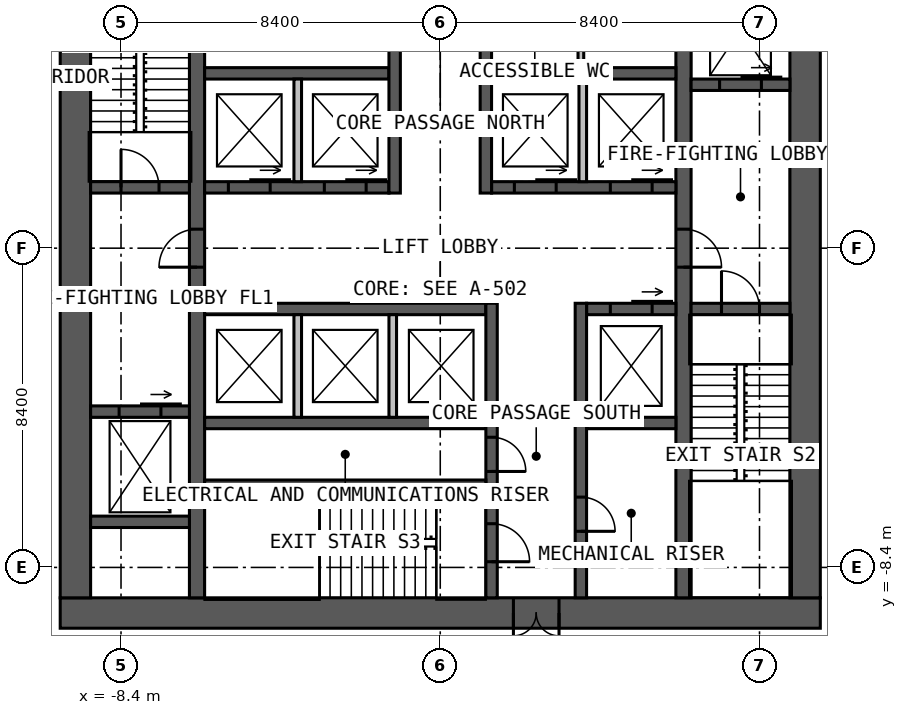
"""IFC4 building model, lengths in metres.
Left out: names, types, materials, properties, quantities, classifications, styles, units other than length and angle.
Written with IfcOpenShell. Run it as: python <this file> out.ifc"""

import sys

from ifc_helpers import new_model, si_unit, direction, frame, frame_2d, origin, place, context, subcontext, project, spatial, rectangle, extrude, element, fill, save


model = new_model("IFC4")
c1 = context("Model", 3, precision=1e-05, world=origin(), true_north=direction((0.0, 1.0)))
c2 = subcontext(c1, "Body", "Model", "MODEL_VIEW")
j1 = project(units=[si_unit("LENGTHUNIT", "METRE"), si_unit("PLANEANGLEUNIT", "RADIAN")], contexts=[c1])
p1 = place(None, origin())
s1 = spatial("IfcSite", under=j1, at=p1, CompositionType="ELEMENT")
p2 = place(p1, origin())
s2 = spatial("IfcBuilding", under=s1, at=p2, CompositionType="ELEMENT")
p3 = place(p2, frame((0.0, 0.0, 53.0)))
s3 = spatial("IfcBuildingStorey", under=s2, at=p3, CompositionType="ELEMENT", Elevation=53.0)
p4 = place(p3, frame((10.0, -9.6, 0.0), z_axis=(0.0, 0.0, 1.0), x_axis=(-1.0, 0.0, 0.0)))
e1 = element("IfcWall", 1, at=p4, inside=s3, PredefinedType="SOLIDWALL", context=c2, shape_type="SweptSolid", body=[
    extrude(rectangle(XDim=20.0, YDim=0.8, at=frame_2d((10.0, 0.0))), origin(), (0.0, 0.0, 1.0), 4.0),
])
p5 = place(p4, frame((6.875, 0.0, 0.0)))
e2 = element("IfcOpeningElement", 2, at=p5, cuts=e1, PredefinedType="OPENING", context=c2, shape_type="SweptSolid", body=[
    extrude(rectangle(XDim=1.2, YDim=2.2, at=frame_2d((0.6, 1.1))), frame((0.0, 0.41, 0.0), z_axis=(0.0, -1.0, 0.0), x_axis=(1.0, 0.0, 0.0)), (0.0, 0.0, 1.0), 0.82),
])
for number, where, z_axis, x_axis in (
    (3, (9.6, -9.2, 0.0), (0.0, 0.0, 1.0), (0.0, 1.0, 0.0)),
    (4, (-9.6, 9.2, 0.0), (0.0, 0.0, 1.0), (0.0, -1.0, 0.0)),
):
    element("IfcWall", number, at=place(p3, frame(where, z_axis=z_axis, x_axis=x_axis)), inside=s3, PredefinedType="SOLIDWALL", context=c2, shape_type="SweptSolid", body=[
        extrude(rectangle(XDim=18.4, YDim=0.8, at=frame_2d((9.2, 0.0))), origin(), (0.0, 0.0, 1.0), 4.0),
    ])
p6 = place(p3, frame((-6.4, -9.2, 0.0), z_axis=(0.0, 0.0, 1.0), x_axis=(0.0, 1.0, 0.0)))
e5 = element("IfcWall", 5, at=p6, inside=s3, PredefinedType="SOLIDWALL", context=c2, shape_type="SweptSolid", body=[
    extrude(rectangle(XDim=18.4, YDim=0.4, at=frame_2d((9.2, 0.0))), origin(), (0.0, 0.0, 1.0), 4.0),
])
p7 = place(p6, frame((8.7, 0.0, 0.0)))
e6 = element("IfcOpeningElement", 6, at=p7, cuts=e5, PredefinedType="OPENING", context=c2, shape_type="SweptSolid", body=[
    extrude(rectangle(XDim=1.0, YDim=2.2, at=frame_2d((0.5, 1.1))), frame((0.0, 0.21, 0.0), z_axis=(0.0, -1.0, 0.0), x_axis=(1.0, 0.0, 0.0)), (0.0, 0.0, 1.0), 0.42),
])
p8 = place(p3, frame((6.4, 9.2, 0.0), z_axis=(0.0, 0.0, 1.0), x_axis=(0.0, -1.0, 0.0)))
e7 = element("IfcWall", 7, at=p8, inside=s3, PredefinedType="SOLIDWALL", context=c2, shape_type="SweptSolid", body=[
    extrude(rectangle(XDim=18.4, YDim=0.4, at=frame_2d((9.2, 0.0))), origin(), (0.0, 0.0, 1.0), 4.0),
])
p9 = place(p8, frame((8.7, 0.0, 0.0)))
e8 = element("IfcOpeningElement", 8, at=p9, cuts=e7, PredefinedType="OPENING", context=c2, shape_type="SweptSolid", body=[
    extrude(rectangle(XDim=1.0, YDim=2.2, at=frame_2d((0.5, 1.1))), frame((0.0, 0.21, 0.0), z_axis=(0.0, -1.0, 0.0), x_axis=(1.0, 0.0, 0.0)), (0.0, 0.0, 1.0), 0.42),
])
p10 = place(p3, frame((-6.2, 1.6, 0.0), z_axis=(0.0, 0.0, 1.0), x_axis=(1.0, 0.0, 0.0)))
e9 = element("IfcWall", 9, at=p10, inside=s3, PredefinedType="SOLIDWALL", context=c2, shape_type="SweptSolid", body=[
    extrude(rectangle(XDim=4.85, YDim=0.3, at=frame_2d((2.425, 0.0))), origin(), (0.0, 0.0, 1.0), 4.0),
])
p11 = place(p10, frame((0.625, 0.0, 0.0)))
e10 = element("IfcOpeningElement", 10, at=p11, cuts=e9, PredefinedType="OPENING", context=c2, shape_type="SweptSolid", body=[
    extrude(rectangle(XDim=1.1, YDim=2.2, at=frame_2d((0.55, 1.1))), frame((0.0, 0.16, 0.0), z_axis=(0.0, -1.0, 0.0), x_axis=(1.0, 0.0, 0.0)), (0.0, 0.0, 1.0), 0.32),
])
p12 = place(p10, frame((3.15, 0.0, 0.0)))
e11 = element("IfcOpeningElement", 11, at=p12, cuts=e9, PredefinedType="OPENING", context=c2, shape_type="SweptSolid", body=[
    extrude(rectangle(XDim=1.1, YDim=2.2, at=frame_2d((0.55, 1.1))), frame((0.0, 0.16, 0.0), z_axis=(0.0, -1.0, 0.0), x_axis=(1.0, 0.0, 0.0)), (0.0, 0.0, 1.0), 0.32),
])
p13 = place(p3, frame((1.35, 1.6, 0.0), z_axis=(0.0, 0.0, 1.0), x_axis=(1.0, 0.0, 0.0)))
e12 = element("IfcWall", 12, at=p13, inside=s3, PredefinedType="SOLIDWALL", context=c2, shape_type="SweptSolid", body=[
    extrude(rectangle(XDim=4.85, YDim=0.3, at=frame_2d((2.425, 0.0))), origin(), (0.0, 0.0, 1.0), 4.0),
])
p14 = place(p13, frame((0.6, 0.0, 0.0)))
e13 = element("IfcOpeningElement", 13, at=p14, cuts=e12, PredefinedType="OPENING", context=c2, shape_type="SweptSolid", body=[
    extrude(rectangle(XDim=1.1, YDim=2.2, at=frame_2d((0.55, 1.1))), frame((0.0, 0.16, 0.0), z_axis=(0.0, -1.0, 0.0), x_axis=(1.0, 0.0, 0.0)), (0.0, 0.0, 1.0), 0.32),
])
p15 = place(p13, frame((3.125, 0.0, 0.0)))
e14 = element("IfcOpeningElement", 14, at=p15, cuts=e12, PredefinedType="OPENING", context=c2, shape_type="SweptSolid", body=[
    extrude(rectangle(XDim=1.1, YDim=2.2, at=frame_2d((0.55, 1.1))), frame((0.0, 0.16, 0.0), z_axis=(0.0, -1.0, 0.0), x_axis=(1.0, 0.0, 0.0)), (0.0, 0.0, 1.0), 0.32),
])
for number, where, z_axis, x_axis in (
    (15, (-6.2, 4.6, 0.0), (0.0, 0.0, 1.0), (1.0, 0.0, 0.0)),
    (16, (1.35, 4.6, 0.0), (0.0, 0.0, 1.0), (1.0, 0.0, 0.0)),
):
    element("IfcWall", number, at=place(p3, frame(where, z_axis=z_axis, x_axis=x_axis)), inside=s3, PredefinedType="SOLIDWALL", context=c2, shape_type="SweptSolid", body=[
        extrude(rectangle(XDim=4.85, YDim=0.3, at=frame_2d((2.425, 0.0))), origin(), (0.0, 0.0, 1.0), 4.0),
    ])
p16 = place(p3, frame((-1.2, 1.45, 0.0), z_axis=(0.0, 0.0, 1.0), x_axis=(0.0, 1.0, 0.0)))
e17 = element("IfcWall", 17, at=p16, inside=s3, PredefinedType="SOLIDWALL", context=c2, shape_type="SweptSolid", body=[
    extrude(rectangle(XDim=7.75, YDim=0.3, at=frame_2d((3.875, 0.0))), origin(), (0.0, 0.0, 1.0), 4.0),
])
p17 = place(p16, frame((5.05, 0.0, 0.0)))
e18 = element("IfcOpeningElement", 18, at=p17, cuts=e17, PredefinedType="OPENING", context=c2, shape_type="SweptSolid", body=[
    extrude(rectangle(XDim=1.0, YDim=2.2, at=frame_2d((0.5, 1.1))), frame((0.0, 0.16, 0.0), z_axis=(0.0, -1.0, 0.0), x_axis=(1.0, 0.0, 0.0)), (0.0, 0.0, 1.0), 0.32),
])
p18 = place(p3, frame((1.2, 1.45, 0.0), z_axis=(0.0, 0.0, 1.0), x_axis=(0.0, 1.0, 0.0)))
e19 = element("IfcWall", 19, at=p18, inside=s3, PredefinedType="SOLIDWALL", context=c2, shape_type="SweptSolid", body=[
    extrude(rectangle(XDim=7.75, YDim=0.3, at=frame_2d((3.875, 0.0))), origin(), (0.0, 0.0, 1.0), 4.0),
])
p19 = place(p18, frame((3.8, 0.0, 0.0)))
e20 = element("IfcOpeningElement", 20, at=p19, cuts=e19, PredefinedType="OPENING", context=c2, shape_type="SweptSolid", body=[
    extrude(rectangle(XDim=1.0, YDim=2.2, at=frame_2d((0.5, 1.1))), frame((0.0, 0.16, 0.0), z_axis=(0.0, -1.0, 0.0), x_axis=(1.0, 0.0, 0.0)), (0.0, 0.0, 1.0), 0.32),
])
p20 = place(p18, frame((6.15, 0.0, 0.0)))
e21 = element("IfcOpeningElement", 21, at=p20, cuts=e19, PredefinedType="OPENING", context=c2, shape_type="SweptSolid", body=[
    extrude(rectangle(XDim=1.0, YDim=2.2, at=frame_2d((0.5, 1.1))), frame((0.0, 0.16, 0.0), z_axis=(0.0, -1.0, 0.0), x_axis=(1.0, 0.0, 0.0)), (0.0, 0.0, 1.0), 0.32),
])
p21 = place(p3, frame((-6.2, -1.6, 0.0), z_axis=(0.0, 0.0, 1.0), x_axis=(1.0, 0.0, 0.0)))
e22 = element("IfcWall", 22, at=p21, inside=s3, PredefinedType="SOLIDWALL", context=c2, shape_type="SweptSolid", body=[
    extrude(rectangle(XDim=7.4, YDim=0.3, at=frame_2d((3.7, 0.0))), origin(), (0.0, 0.0, 1.0), 4.0),
])
p22 = place(p3, frame((3.85, -1.6, 0.0), z_axis=(0.0, 0.0, 1.0), x_axis=(1.0, 0.0, 0.0)))
e23 = element("IfcWall", 23, at=p22, inside=s3, PredefinedType="SOLIDWALL", context=c2, shape_type="SweptSolid", body=[
    extrude(rectangle(XDim=2.35, YDim=0.3, at=frame_2d((1.175, 0.0))), origin(), (0.0, 0.0, 1.0), 4.0),
])
p23 = place(p22, frame((0.625, 0.0, 0.0)))
e24 = element("IfcOpeningElement", 24, at=p23, cuts=e23, PredefinedType="OPENING", context=c2, shape_type="SweptSolid", body=[
    extrude(rectangle(XDim=1.1, YDim=2.2, at=frame_2d((0.55, 1.1))), frame((0.0, 0.16, 0.0), z_axis=(0.0, -1.0, 0.0), x_axis=(1.0, 0.0, 0.0)), (0.0, 0.0, 1.0), 0.32),
])
p24 = place(p3, frame((-6.2, -4.6, 0.0), z_axis=(0.0, 0.0, 1.0), x_axis=(1.0, 0.0, 0.0)))
e25 = element("IfcWall", 25, at=p24, inside=s3, PredefinedType="SOLIDWALL", context=c2, shape_type="SweptSolid", body=[
    extrude(rectangle(XDim=7.4, YDim=0.3, at=frame_2d((3.7, 0.0))), origin(), (0.0, 0.0, 1.0), 4.0),
])
p25 = place(p3, frame((3.85, -4.6, 0.0), z_axis=(0.0, 0.0, 1.0), x_axis=(1.0, 0.0, 0.0)))
e26 = element("IfcWall", 26, at=p25, inside=s3, PredefinedType="SOLIDWALL", context=c2, shape_type="SweptSolid", body=[
    extrude(rectangle(XDim=2.35, YDim=0.3, at=frame_2d((1.175, 0.0))), origin(), (0.0, 0.0, 1.0), 4.0),
])
p26 = place(p3, frame((1.35, -1.45, 0.0), z_axis=(0.0, 0.0, 1.0), x_axis=(0.0, -1.0, 0.0)))
e27 = element("IfcWall", 27, at=p26, inside=s3, PredefinedType="SOLIDWALL", context=c2, shape_type="SweptSolid", body=[
    extrude(rectangle(XDim=7.75, YDim=0.3, at=frame_2d((3.875, 0.0))), origin(), (0.0, 0.0, 1.0), 4.0),
])
p27 = place(p26, frame((5.8, 0.0, 0.0)))
e28 = element("IfcOpeningElement", 28, at=p27, cuts=e27, PredefinedType="OPENING", context=c2, shape_type="SweptSolid", body=[
    extrude(rectangle(XDim=1.0, YDim=2.2, at=frame_2d((0.5, 1.1))), frame((0.0, 0.16, 0.0), z_axis=(0.0, -1.0, 0.0), x_axis=(1.0, 0.0, 0.0)), (0.0, 0.0, 1.0), 0.32),
])
p28 = place(p26, frame((3.525, 0.0, 0.0)))
e29 = element("IfcOpeningElement", 29, at=p28, cuts=e27, PredefinedType="OPENING", context=c2, shape_type="SweptSolid", body=[
    extrude(rectangle(XDim=0.9, YDim=2.2, at=frame_2d((0.45, 1.1))), frame((0.0, 0.16, 0.0), z_axis=(0.0, -1.0, 0.0), x_axis=(1.0, 0.0, 0.0)), (0.0, 0.0, 1.0), 0.32),
])
p29 = place(p3, frame((3.7, -1.45, 0.0), z_axis=(0.0, 0.0, 1.0), x_axis=(0.0, -1.0, 0.0)))
e30 = element("IfcWall", 30, at=p29, inside=s3, PredefinedType="SOLIDWALL", context=c2, shape_type="SweptSolid", body=[
    extrude(rectangle(XDim=7.75, YDim=0.3, at=frame_2d((3.875, 0.0))), origin(), (0.0, 0.0, 1.0), 4.0),
])
p30 = place(p29, frame((5.1, 0.0, 0.0)))
e31 = element("IfcOpeningElement", 31, at=p30, cuts=e30, PredefinedType="OPENING", context=c2, shape_type="SweptSolid", body=[
    extrude(rectangle(XDim=0.9, YDim=2.2, at=frame_2d((0.45, 1.1))), frame((0.0, 0.16, 0.0), z_axis=(0.0, -1.0, 0.0), x_axis=(1.0, 0.0, 0.0)), (0.0, 0.0, 1.0), 0.32),
])
p31 = place(p3, frame((-6.2, -6.2, 0.0), z_axis=(0.0, 0.0, 1.0), x_axis=(1.0, 0.0, 0.0)))
e32 = element("IfcWall", 32, at=p31, inside=s3, PredefinedType="SOLIDWALL", context=c2, shape_type="SweptSolid", body=[
    extrude(rectangle(XDim=7.4, YDim=0.2, at=frame_2d((3.7, 0.0))), origin(), (0.0, 0.0, 1.0), 4.0),
])
p32 = place(p3, frame((-9.2, 1.6, 0.0), z_axis=(0.0, 0.0, 1.0), x_axis=(1.0, 0.0, 0.0)))
e33 = element("IfcWall", 33, at=p32, inside=s3, PredefinedType="SOLIDWALL", context=c2, shape_type="SweptSolid", body=[
    extrude(rectangle(XDim=2.6, YDim=0.3, at=frame_2d((1.3, 0.0))), origin(), (0.0, 0.0, 1.0), 4.0),
])
p33 = place(p32, frame((0.8, 0.0, 0.0)))
e34 = element("IfcOpeningElement", 34, at=p33, cuts=e33, PredefinedType="OPENING", context=c2, shape_type="SweptSolid", body=[
    extrude(rectangle(XDim=1.0, YDim=2.2, at=frame_2d((0.5, 1.1))), frame((0.0, 0.16, 0.0), z_axis=(0.0, -1.0, 0.0), x_axis=(1.0, 0.0, 0.0)), (0.0, 0.0, 1.0), 0.32),
])
p34 = place(p3, frame((6.6, -1.6, 0.0), z_axis=(0.0, 0.0, 1.0), x_axis=(1.0, 0.0, 0.0)))
e35 = element("IfcWall", 35, at=p34, inside=s3, PredefinedType="SOLIDWALL", context=c2, shape_type="SweptSolid", body=[
    extrude(rectangle(XDim=2.6, YDim=0.3, at=frame_2d((1.3, 0.0))), origin(), (0.0, 0.0, 1.0), 4.0),
])
p35 = place(p34, frame((0.8, 0.0, 0.0)))
e36 = element("IfcOpeningElement", 36, at=p35, cuts=e35, PredefinedType="OPENING", context=c2, shape_type="SweptSolid", body=[
    extrude(rectangle(XDim=1.0, YDim=2.2, at=frame_2d((0.5, 1.1))), frame((0.0, 0.16, 0.0), z_axis=(0.0, -1.0, 0.0), x_axis=(1.0, 0.0, 0.0)), (0.0, 0.0, 1.0), 0.32),
])
p36 = place(p3, frame((-9.2, -4.3, 0.0), z_axis=(0.0, 0.0, 1.0), x_axis=(1.0, 0.0, 0.0)))
e37 = element("IfcWall", 37, at=p36, inside=s3, PredefinedType="SOLIDWALL", context=c2, shape_type="SweptSolid", body=[
    extrude(rectangle(XDim=2.6, YDim=0.3, at=frame_2d((1.3, 0.0))), origin(), (0.0, 0.0, 1.0), 4.0),
])
p37 = place(p36, frame((0.75, 0.0, 0.0)))
e38 = element("IfcOpeningElement", 38, at=p37, cuts=e37, PredefinedType="OPENING", context=c2, shape_type="SweptSolid", body=[
    extrude(rectangle(XDim=1.1, YDim=2.2, at=frame_2d((0.55, 1.1))), frame((0.0, 0.16, 0.0), z_axis=(0.0, -1.0, 0.0), x_axis=(1.0, 0.0, 0.0)), (0.0, 0.0, 1.0), 0.32),
])
p38 = place(p3, frame((6.6, 4.3, 0.0), z_axis=(0.0, 0.0, 1.0), x_axis=(1.0, 0.0, 0.0)))
e39 = element("IfcWall", 39, at=p38, inside=s3, PredefinedType="SOLIDWALL", context=c2, shape_type="SweptSolid", body=[
    extrude(rectangle(XDim=2.6, YDim=0.3, at=frame_2d((1.3, 0.0))), origin(), (0.0, 0.0, 1.0), 4.0),
])
p39 = place(p38, frame((0.75, 0.0, 0.0)))
e40 = element("IfcOpeningElement", 40, at=p39, cuts=e39, PredefinedType="OPENING", context=c2, shape_type="SweptSolid", body=[
    extrude(rectangle(XDim=1.1, YDim=2.2, at=frame_2d((0.55, 1.1))), frame((0.0, 0.16, 0.0), z_axis=(0.0, -1.0, 0.0), x_axis=(1.0, 0.0, 0.0)), (0.0, 0.0, 1.0), 0.32),
])
p40 = place(p3, frame((-9.2, -7.2, 0.0), z_axis=(0.0, 0.0, 1.0), x_axis=(1.0, 0.0, 0.0)))
e41 = element("IfcWall", 41, at=p40, inside=s3, PredefinedType="SOLIDWALL", context=c2, shape_type="SweptSolid", body=[
    extrude(rectangle(XDim=2.6, YDim=0.3, at=frame_2d((1.3, 0.0))), origin(), (0.0, 0.0, 1.0), 4.0),
])
for number, where, z_axis, x_axis in (
    (42, (-3.75, 1.75, 0.0), (0.0, 0.0, 1.0), (0.0, 1.0, 0.0)),
    (43, (3.75, 1.75, 0.0), (0.0, 0.0, 1.0), (0.0, 1.0, 0.0)),
    (44, (-3.75, -1.75, 0.0), (0.0, 0.0, 1.0), (0.0, -1.0, 0.0)),
    (45, (-1.25, -1.75, 0.0), (0.0, 0.0, 1.0), (0.0, -1.0, 0.0)),
):
    element("IfcWall", number, at=place(p3, frame(where, z_axis=z_axis, x_axis=x_axis)), inside=s3, PredefinedType="SOLIDWALL", context=c2, shape_type="SweptSolid", body=[
        extrude(rectangle(XDim=2.7, YDim=0.2, at=frame_2d((1.35, 0.0))), origin(), (0.0, 0.0, 1.0), 3.75),
    ])
p41 = place(p3, frame((3.7, 4.75, 0.0), z_axis=(0.0, 0.0, 1.0), x_axis=(0.0, 1.0, 0.0)))
e46 = element("IfcWall", 46, at=p41, inside=s3, PredefinedType="PARTITIONING", context=c2, shape_type="SweptSolid", body=[
    extrude(rectangle(XDim=1.975, YDim=0.15, at=frame_2d((0.988, 0.0))), origin(), (0.0, 0.0, 1.0), 3.75),
])
p42 = place(p5, origin())
e47 = element("IfcDoor", 47, at=p42, inside=s3, OperationType="DOUBLE_DOOR_SINGLE_SWING", PredefinedType="DOOR", context=c2, shape_type="SweptSolid", body=[
    extrude(rectangle(XDim=1.2, YDim=2.2, at=frame_2d((0.6, 1.1))), frame((0.0, 0.025, 0.0), z_axis=(0.0, -1.0, 0.0), x_axis=(1.0, 0.0, 0.0)), (0.0, 0.0, 1.0), 0.05),
])
fill(e2, e47)
p43 = place(p7, origin())
e48 = element("IfcDoor", 48, at=p43, inside=s3, OperationType="SINGLE_SWING_LEFT", PredefinedType="DOOR", context=c2, shape_type="SweptSolid", body=[
    extrude(rectangle(XDim=1.0, YDim=2.2, at=frame_2d((0.5, 1.1))), frame((0.0, 0.025, 0.0), z_axis=(0.0, -1.0, 0.0), x_axis=(1.0, 0.0, 0.0)), (0.0, 0.0, 1.0), 0.05),
])
fill(e6, e48)
p44 = place(p9, origin())
e49 = element("IfcDoor", 49, at=p44, inside=s3, OperationType="SINGLE_SWING_RIGHT", PredefinedType="DOOR", context=c2, shape_type="SweptSolid", body=[
    extrude(rectangle(XDim=1.0, YDim=2.2, at=frame_2d((0.5, 1.1))), frame((0.0, 0.025, 0.0), z_axis=(0.0, -1.0, 0.0), x_axis=(1.0, 0.0, 0.0)), (0.0, 0.0, 1.0), 0.05),
])
fill(e8, e49)
p45 = place(p33, origin())
e50 = element("IfcDoor", 50, at=p45, inside=s3, OperationType="SINGLE_SWING_LEFT", PredefinedType="DOOR", context=c2, shape_type="SweptSolid", body=[
    extrude(rectangle(XDim=1.0, YDim=2.2, at=frame_2d((0.5, 1.1))), frame((0.0, 0.025, 0.0), z_axis=(0.0, -1.0, 0.0), x_axis=(1.0, 0.0, 0.0)), (0.0, 0.0, 1.0), 0.05),
])
fill(e34, e50)
p46 = place(p35, origin())
e51 = element("IfcDoor", 51, at=p46, inside=s3, OperationType="SINGLE_SWING_LEFT", PredefinedType="DOOR", context=c2, shape_type="SweptSolid", body=[
    extrude(rectangle(XDim=1.0, YDim=2.2, at=frame_2d((0.5, 1.1))), frame((0.0, 0.025, 0.0), z_axis=(0.0, -1.0, 0.0), x_axis=(1.0, 0.0, 0.0)), (0.0, 0.0, 1.0), 0.05),
])
fill(e36, e51)
p47 = place(p27, origin())
e52 = element("IfcDoor", 52, at=p47, inside=s3, OperationType="SINGLE_SWING_RIGHT", PredefinedType="DOOR", context=c2, shape_type="SweptSolid", body=[
    extrude(rectangle(XDim=1.0, YDim=2.2, at=frame_2d((0.5, 1.1))), frame((0.0, 0.025, 0.0), z_axis=(0.0, -1.0, 0.0), x_axis=(1.0, 0.0, 0.0)), (0.0, 0.0, 1.0), 0.05),
])
fill(e28, e52)
p48 = place(p28, origin())
e53 = element("IfcDoor", 53, at=p48, inside=s3, OperationType="SINGLE_SWING_RIGHT", PredefinedType="DOOR", context=c2, shape_type="SweptSolid", body=[
    extrude(rectangle(XDim=0.9, YDim=2.2, at=frame_2d((0.45, 1.1))), frame((0.0, 0.025, 0.0), z_axis=(0.0, -1.0, 0.0), x_axis=(1.0, 0.0, 0.0)), (0.0, 0.0, 1.0), 0.05),
])
fill(e29, e53)
p49 = place(p30, origin())
e54 = element("IfcDoor", 54, at=p49, inside=s3, OperationType="SINGLE_SWING_RIGHT", PredefinedType="DOOR", context=c2, shape_type="SweptSolid", body=[
    extrude(rectangle(XDim=0.9, YDim=2.2, at=frame_2d((0.45, 1.1))), frame((0.0, 0.025, 0.0), z_axis=(0.0, -1.0, 0.0), x_axis=(1.0, 0.0, 0.0)), (0.0, 0.0, 1.0), 0.05),
])
fill(e31, e54)
p50 = place(p11, origin())
e55 = element("IfcDoor", 55, at=p50, inside=s3, OperationType="SLIDING_TO_LEFT", PredefinedType="DOOR", context=c2, shape_type="SweptSolid", body=[
    extrude(rectangle(XDim=1.1, YDim=2.2, at=frame_2d((0.55, 1.1))), frame((0.0, 0.025, 0.0), z_axis=(0.0, -1.0, 0.0), x_axis=(1.0, 0.0, 0.0)), (0.0, 0.0, 1.0), 0.05),
])
fill(e10, e55)
p51 = place(p12, origin())
e56 = element("IfcDoor", 56, at=p51, inside=s3, OperationType="SLIDING_TO_LEFT", PredefinedType="DOOR", context=c2, shape_type="SweptSolid", body=[
    extrude(rectangle(XDim=1.1, YDim=2.2, at=frame_2d((0.55, 1.1))), frame((0.0, 0.025, 0.0), z_axis=(0.0, -1.0, 0.0), x_axis=(1.0, 0.0, 0.0)), (0.0, 0.0, 1.0), 0.05),
])
fill(e11, e56)
p52 = place(p14, origin())
e57 = element("IfcDoor", 57, at=p52, inside=s3, OperationType="SLIDING_TO_LEFT", PredefinedType="DOOR", context=c2, shape_type="SweptSolid", body=[
    extrude(rectangle(XDim=1.1, YDim=2.2, at=frame_2d((0.55, 1.1))), frame((0.0, 0.025, 0.0), z_axis=(0.0, -1.0, 0.0), x_axis=(1.0, 0.0, 0.0)), (0.0, 0.0, 1.0), 0.05),
])
fill(e13, e57)
p53 = place(p15, origin())
e58 = element("IfcDoor", 58, at=p53, inside=s3, OperationType="SLIDING_TO_LEFT", PredefinedType="DOOR", context=c2, shape_type="SweptSolid", body=[
    extrude(rectangle(XDim=1.1, YDim=2.2, at=frame_2d((0.55, 1.1))), frame((0.0, 0.025, 0.0), z_axis=(0.0, -1.0, 0.0), x_axis=(1.0, 0.0, 0.0)), (0.0, 0.0, 1.0), 0.05),
])
fill(e14, e58)
p54 = place(p23, origin())
e59 = element("IfcDoor", 59, at=p54, inside=s3, OperationType="SLIDING_TO_LEFT", PredefinedType="DOOR", context=c2, shape_type="SweptSolid", body=[
    extrude(rectangle(XDim=1.1, YDim=2.2, at=frame_2d((0.55, 1.1))), frame((0.0, 0.025, 0.0), z_axis=(0.0, -1.0, 0.0), x_axis=(1.0, 0.0, 0.0)), (0.0, 0.0, 1.0), 0.05),
])
fill(e24, e59)
p55 = place(p37, origin())
e60 = element("IfcDoor", 60, at=p55, inside=s3, OperationType="SLIDING_TO_LEFT", PredefinedType="DOOR", context=c2, shape_type="SweptSolid", body=[
    extrude(rectangle(XDim=1.1, YDim=2.2, at=frame_2d((0.55, 1.1))), frame((0.0, 0.025, 0.0), z_axis=(0.0, -1.0, 0.0), x_axis=(1.0, 0.0, 0.0)), (0.0, 0.0, 1.0), 0.05),
])
fill(e38, e60)
p56 = place(p39, origin())
e61 = element("IfcDoor", 61, at=p56, inside=s3, OperationType="SLIDING_TO_LEFT", PredefinedType="DOOR", context=c2, shape_type="SweptSolid", body=[
    extrude(rectangle(XDim=1.1, YDim=2.2, at=frame_2d((0.55, 1.1))), frame((0.0, 0.025, 0.0), z_axis=(0.0, -1.0, 0.0), x_axis=(1.0, 0.0, 0.0)), (0.0, 0.0, 1.0), 0.05),
])
fill(e40, e61)
save(model, sys.argv[1])
